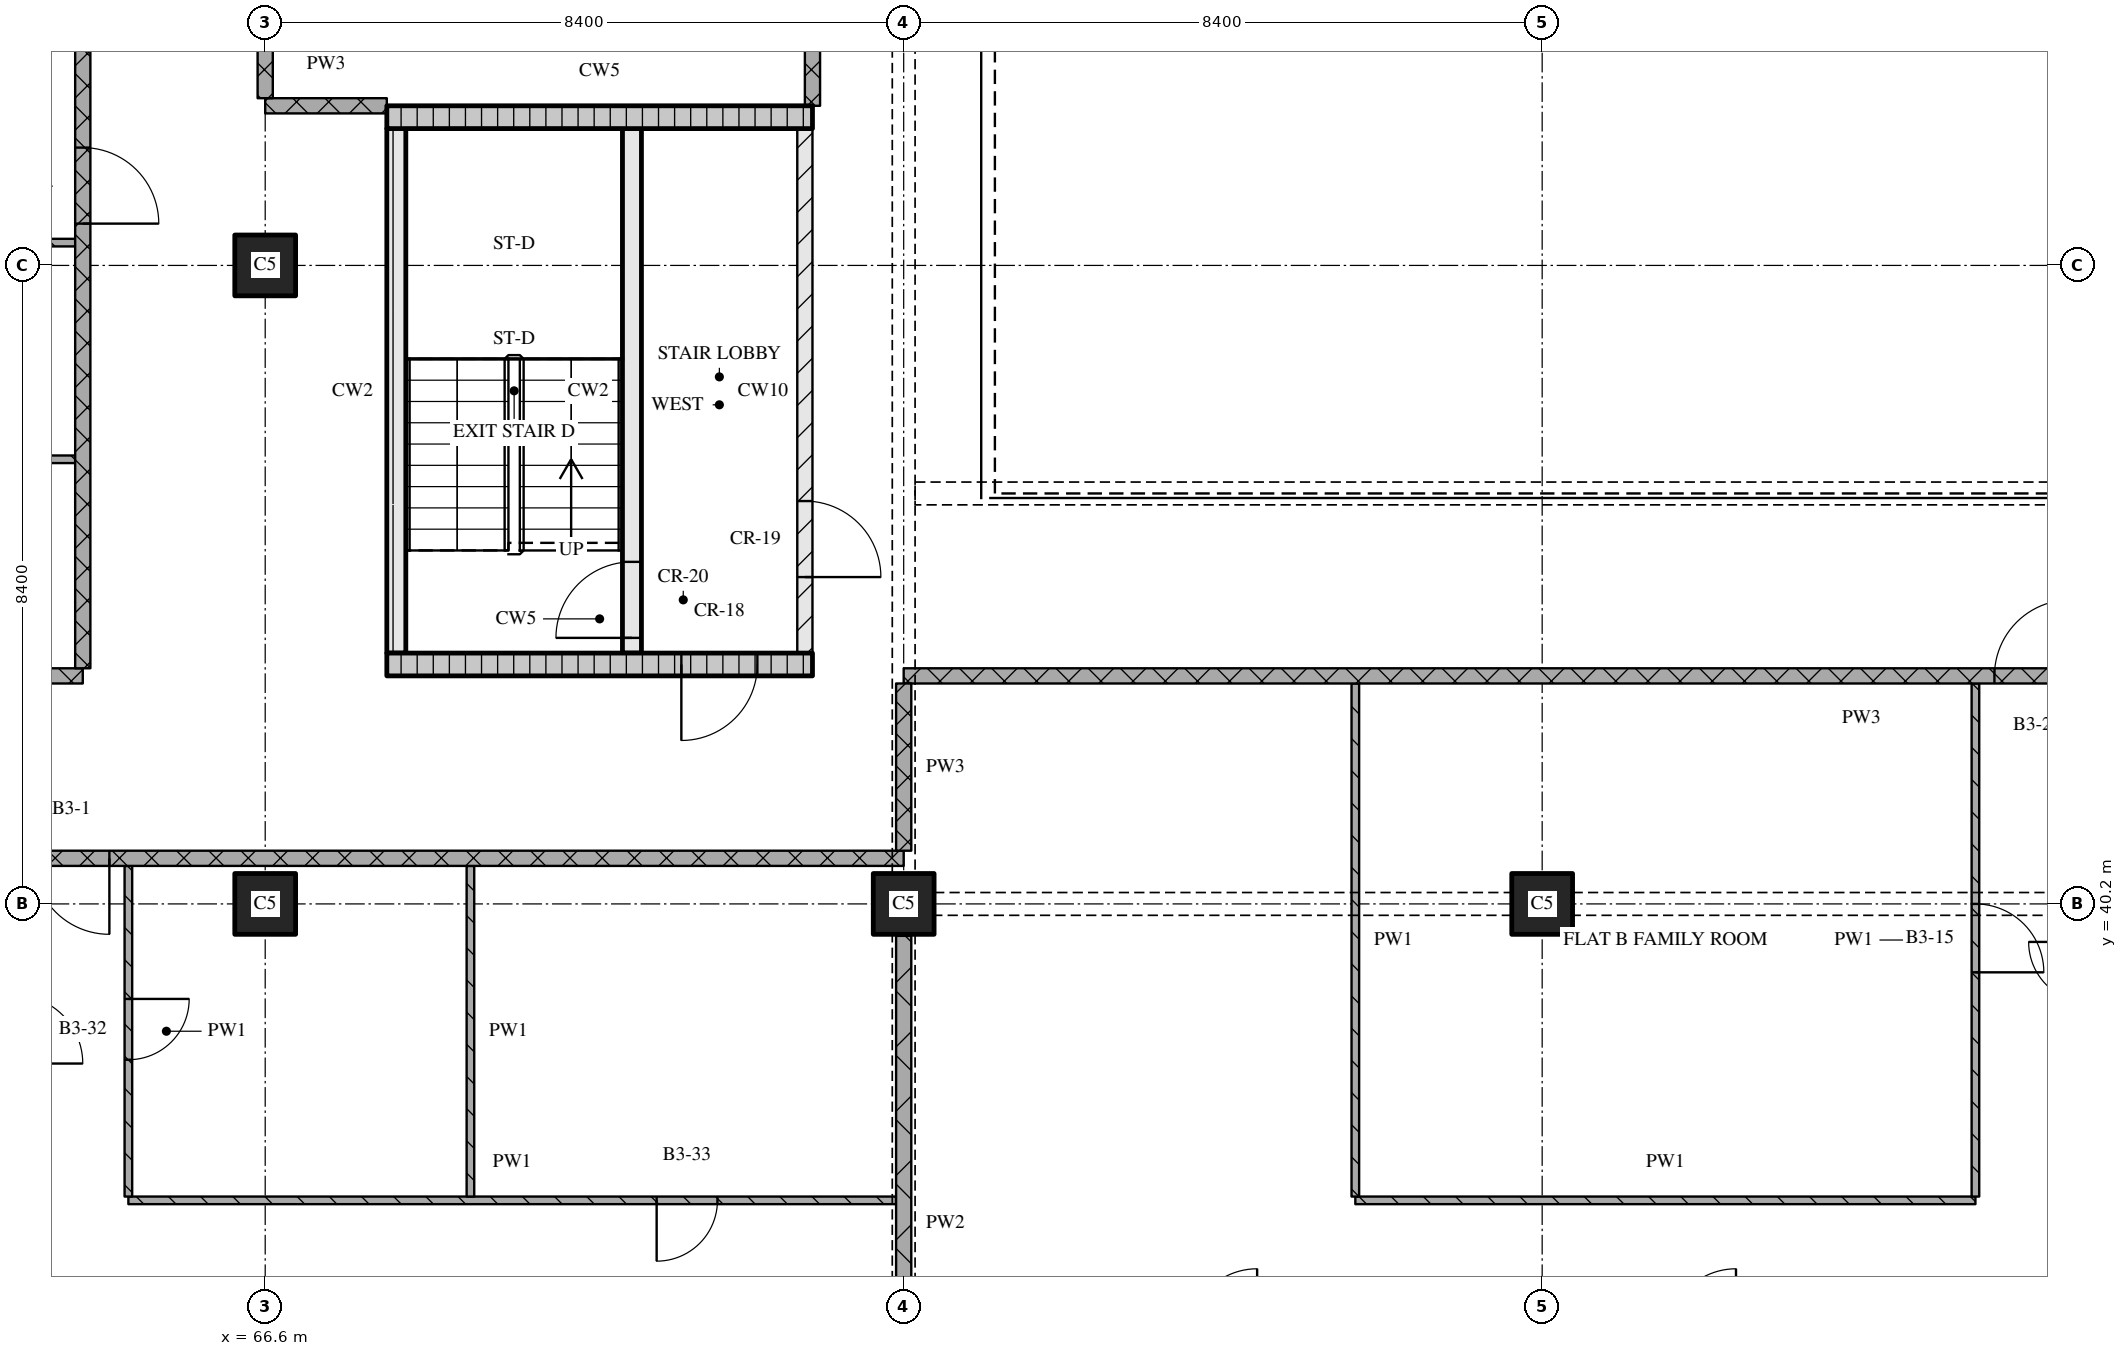
"""IFC4 building model, lengths in metres.
Left out: names, types, materials, properties, quantities, classifications, styles, units other than length and angle.
Written with IfcOpenShell. Run it as: python <this file> out.ifc"""

import sys

from ifc_helpers import new_model, si_unit, direction, frame, frame_2d, origin, origin_2d, place, context, subcontext, project, spatial, rectangle, extrude, element, fill, save


model = new_model("IFC4")
c1 = context("Model", 3, precision=1e-05, world=origin(), true_north=direction((0.0, 1.0)))
c2 = subcontext(c1, "Body", "Model", "MODEL_VIEW")
j1 = project(units=[si_unit("LENGTHUNIT", "METRE"), si_unit("PLANEANGLEUNIT", "RADIAN")], contexts=[c1])
p1 = place(None, origin())
s1 = spatial("IfcSite", under=j1, at=p1, CompositionType="ELEMENT")
p2 = place(p1, origin())
s2 = spatial("IfcBuilding", under=s1, at=p2, CompositionType="ELEMENT")
p3 = place(p2, frame((0.0, 0.0, 124.05)))
s3 = spatial("IfcBuildingStorey", under=s2, at=p3, CompositionType="ELEMENT", Elevation=124.05)
for number, where, z_axis, x_axis in (
    (1, (66.6, 40.2, 0.0), (0.0, 0.0, 1.0), (1.0, 0.0, 0.0)),
    (2, (66.6, 48.6, 0.0), (0.0, 0.0, 1.0), (1.0, 0.0, 0.0)),
    (3, (75.0, 40.2, 0.0), (0.0, 0.0, 1.0), (1.0, 0.0, 0.0)),
    (4, (83.4, 40.2, 0.0), (0.0, 0.0, 1.0), (1.0, 0.0, 0.0)),
):
    element("IfcColumn", number, at=place(p3, frame(where, z_axis=z_axis, x_axis=x_axis)), inside=s3, PredefinedType="COLUMN", context=c2, shape_type="SweptSolid", body=[
        extrude(rectangle(XDim=0.8, YDim=0.8, at=origin_2d()), origin(), (0.0, 0.0, 1.0), 3.6),
    ])
p4 = place(p3, frame((68.2, 43.35, 0.0), z_axis=(0.0, 0.0, 1.0), x_axis=(1.0, 0.0, 0.0)))
e5 = element("IfcWall", 5, at=p4, inside=s3, PredefinedType="SOLIDWALL", context=c2, shape_type="SweptSolid", body=[
    extrude(rectangle(XDim=5.6, YDim=0.3, at=frame_2d((2.8, 0.0))), origin(), (0.0, 0.0, 1.0), 3.32),
])
p5 = place(p4, frame((3.875, 0.0, 0.0)))
e6 = element("IfcOpeningElement", 6, at=p5, cuts=e5, PredefinedType="OPENING", context=c2, shape_type="SweptSolid", body=[
    extrude(rectangle(XDim=1.0, YDim=2.1, at=frame_2d((0.5, 1.05))), frame((0.0, 0.16, 0.0), z_axis=(0.0, -1.0, 0.0), x_axis=(1.0, 0.0, 0.0)), (0.0, 0.0, 1.0), 0.32),
])
p6 = place(p3, frame((68.325, 43.5, 0.0), z_axis=(0.0, 0.0, 1.0), x_axis=(0.0, 1.0, 0.0)))
e7 = element("IfcWall", 7, at=p6, inside=s3, PredefinedType="SOLIDWALL", context=c2, shape_type="SweptSolid", body=[
    extrude(rectangle(XDim=6.9, YDim=0.25, at=frame_2d((3.45, 0.0))), origin(), (0.0, 0.0, 1.0), 3.32),
])
p7 = place(p3, frame((71.425, 43.5, 0.0), z_axis=(0.0, 0.0, 1.0), x_axis=(0.0, 1.0, 0.0)))
e8 = element("IfcWall", 8, at=p7, inside=s3, PredefinedType="SOLIDWALL", context=c2, shape_type="SweptSolid", body=[
    extrude(rectangle(XDim=6.9, YDim=0.25, at=frame_2d((3.45, 0.0))), origin(), (0.0, 0.0, 1.0), 3.32),
])
p8 = place(p7, frame((0.2, 0.0, 0.0)))
e9 = element("IfcOpeningElement", 9, at=p8, cuts=e8, PredefinedType="OPENING", context=c2, shape_type="SweptSolid", body=[
    extrude(rectangle(XDim=1.0, YDim=2.1, at=frame_2d((0.5, 1.05))), frame((0.0, 0.135, 0.0), z_axis=(0.0, -1.0, 0.0), x_axis=(1.0, 0.0, 0.0)), (0.0, 0.0, 1.0), 0.27),
])
p9 = place(p3, frame((73.7, 43.5, 0.0), z_axis=(0.0, 0.0, 1.0), x_axis=(0.0, 1.0, 0.0)))
e10 = element("IfcWall", 10, at=p9, inside=s3, PredefinedType="PARTITIONING", context=c2, shape_type="SweptSolid", body=[
    extrude(rectangle(XDim=6.9, YDim=0.2, at=frame_2d((3.45, 0.0))), origin(), (0.0, 0.0, 1.0), 3.32),
])
p10 = place(p9, frame((1.0, 0.0, 0.0)))
e11 = element("IfcOpeningElement", 11, at=p10, cuts=e10, PredefinedType="OPENING", context=c2, shape_type="SweptSolid", body=[
    extrude(rectangle(XDim=1.0, YDim=2.1, at=frame_2d((0.5, 1.05))), frame((0.0, 0.11, 0.0), z_axis=(0.0, -1.0, 0.0), x_axis=(1.0, 0.0, 0.0)), (0.0, 0.0, 1.0), 0.22),
])
p11 = place(p3, frame((68.2, 50.55, 0.0), z_axis=(0.0, 0.0, 1.0), x_axis=(1.0, 0.0, 0.0)))
e12 = element("IfcWall", 12, at=p11, inside=s3, PredefinedType="SOLIDWALL", context=c2, shape_type="SweptSolid", body=[
    extrude(rectangle(XDim=5.6, YDim=0.3, at=frame_2d((2.8, 0.0))), origin(), (0.0, 0.0, 1.0), 3.32),
])
p12 = place(p3, frame((64.8, 36.3, 0.0), z_axis=(0.0, 0.0, 1.0), x_axis=(1.0, 0.0, 0.0)))
e13 = element("IfcWall", 13, at=p12, inside=s3, PredefinedType="PARTITIONING", context=c2, shape_type="SweptSolid", body=[
    extrude(rectangle(XDim=10.1, YDim=0.1, at=frame_2d((5.05, 0.0))), origin(), (0.0, 0.0, 1.0), 3.32),
])
p13 = place(p12, frame((6.95, 0.0, 0.0)))
e14 = element("IfcOpeningElement", 14, at=p13, cuts=e13, PredefinedType="OPENING", context=c2, shape_type="SweptSolid", body=[
    extrude(rectangle(XDim=0.8, YDim=2.1, at=frame_2d((0.4, 1.05))), frame((0.0, 0.06, 0.0), z_axis=(0.0, -1.0, 0.0), x_axis=(1.0, 0.0, 0.0)), (0.0, 0.0, 1.0), 0.12),
])
p14 = place(p3, frame((80.942, 36.3, 0.0), z_axis=(0.0, 0.0, 1.0), x_axis=(1.0, 0.0, 0.0)))
e15 = element("IfcWall", 15, at=p14, inside=s3, PredefinedType="PARTITIONING", context=c2, shape_type="SweptSolid", body=[
    extrude(rectangle(XDim=8.158, YDim=0.1, at=frame_2d((4.079, 0.0))), origin(), (0.0, 0.0, 1.0), 3.32),
])
p15 = place(p3, frame((75.0, 40.8, 0.0), z_axis=(0.0, 0.0, 1.0), x_axis=(-1.0, 0.0, 0.0)))
e16 = element("IfcWall", 16, at=p15, inside=s3, PredefinedType="PARTITIONING", context=c2, shape_type="SweptSolid", body=[
    extrude(rectangle(XDim=24.18, YDim=0.2, at=frame_2d((12.09, 0.0))), origin(), (0.0, 0.0, 1.0), 3.32),
])
p16 = place(p15, frame((10.45, 0.0, 0.0)))
e17 = element("IfcOpeningElement", 17, at=p16, cuts=e16, PredefinedType="OPENING", context=c2, shape_type="SweptSolid", body=[
    extrude(rectangle(XDim=1.0, YDim=2.1, at=frame_2d((0.5, 1.05))), frame((0.0, 0.11, 0.0), z_axis=(0.0, -1.0, 0.0), x_axis=(1.0, 0.0, 0.0)), (0.0, 0.0, 1.0), 0.22),
])
p17 = place(p3, frame((48.28, 43.2, 0.0), z_axis=(0.0, 0.0, 1.0), x_axis=(1.0, 0.0, 0.0)))
e18 = element("IfcWall", 18, at=p17, inside=s3, PredefinedType="PARTITIONING", context=c2, shape_type="SweptSolid", body=[
    extrude(rectangle(XDim=15.92, YDim=0.2, at=frame_2d((7.96, 0.0))), origin(), (0.0, 0.0, 1.0), 3.32),
])
p18 = place(p3, frame((100.2, 43.2, 0.0), z_axis=(0.0, 0.0, 1.0), x_axis=(-1.0, 0.0, 0.0)))
e19 = element("IfcWall", 19, at=p18, inside=s3, PredefinedType="PARTITIONING", context=c2, shape_type="SweptSolid", body=[
    extrude(rectangle(XDim=25.2, YDim=0.2, at=frame_2d((12.6, 0.0))), origin(), (0.0, 0.0, 1.0), 3.32),
])
p19 = place(p18, frame((9.85, 0.0, 0.0)))
e20 = element("IfcOpeningElement", 20, at=p19, cuts=e19, PredefinedType="OPENING", context=c2, shape_type="SweptSolid", body=[
    extrude(rectangle(XDim=1.0, YDim=2.1, at=frame_2d((0.5, 1.05))), frame((0.0, 0.11, 0.0), z_axis=(0.0, -1.0, 0.0), x_axis=(1.0, 0.0, 0.0)), (0.0, 0.0, 1.0), 0.22),
])
p20 = place(p3, frame((54.95, 46.05, 0.0), z_axis=(0.0, 0.0, 1.0), x_axis=(1.0, 0.0, 0.0)))
e21 = element("IfcWall", 21, at=p20, inside=s3, PredefinedType="PARTITIONING", context=c2, shape_type="SweptSolid", body=[
    extrude(rectangle(XDim=9.15, YDim=0.1, at=frame_2d((4.575, 0.0))), origin(), (0.0, 0.0, 1.0), 3.32),
])
p21 = place(p3, frame((58.62, 48.9, 0.0), z_axis=(0.0, 0.0, 1.0), x_axis=(1.0, 0.0, 0.0)))
e22 = element("IfcWall", 22, at=p21, inside=s3, PredefinedType="PARTITIONING", context=c2, shape_type="SweptSolid", body=[
    extrude(rectangle(XDim=5.48, YDim=0.1, at=frame_2d((2.74, 0.0))), origin(), (0.0, 0.0, 1.0), 3.32),
])
p22 = place(p3, frame((66.6, 50.7, 0.0), z_axis=(0.0, 0.0, 1.0), x_axis=(1.0, 0.0, 0.0)))
e23 = element("IfcWall", 23, at=p22, inside=s3, PredefinedType="PARTITIONING", context=c2, shape_type="SweptSolid", body=[
    extrude(rectangle(XDim=1.6, YDim=0.2, at=frame_2d((0.8, 0.0))), origin(), (0.0, 0.0, 1.0), 3.32),
])
p23 = place(p3, frame((64.2, 43.3, 0.0), z_axis=(0.0, 0.0, 1.0), x_axis=(0.0, 1.0, 0.0)))
e24 = element("IfcWall", 24, at=p23, inside=s3, PredefinedType="PARTITIONING", context=c2, shape_type="SweptSolid", body=[
    extrude(rectangle(XDim=32.02, YDim=0.2, at=frame_2d((16.01, 0.0))), origin(), (0.0, 0.0, 1.0), 3.32),
])
p24 = place(p23, frame((5.85, 0.0, 0.0)))
e25 = element("IfcOpeningElement", 25, at=p24, cuts=e24, PredefinedType="OPENING", context=c2, shape_type="SweptSolid", body=[
    extrude(rectangle(XDim=1.0, YDim=2.1, at=frame_2d((0.5, 1.05))), frame((0.0, 0.11, 0.0), z_axis=(0.0, -1.0, 0.0), x_axis=(1.0, 0.0, 0.0)), (0.0, 0.0, 1.0), 0.22),
])
p25 = place(p23, frame((25.95, 0.0, 0.0)))
e26 = element("IfcOpeningElement", 26, at=p25, cuts=e24, PredefinedType="OPENING", context=c2, shape_type="SweptSolid", body=[
    extrude(rectangle(XDim=1.0, YDim=2.1, at=frame_2d((0.5, 1.05))), frame((0.0, 0.11, 0.0), z_axis=(0.0, -1.0, 0.0), x_axis=(1.0, 0.0, 0.0)), (0.0, 0.0, 1.0), 0.22),
])
p26 = place(p3, frame((64.8, 40.7, 0.0), z_axis=(0.0, 0.0, 1.0), x_axis=(0.0, -1.0, 0.0)))
e27 = element("IfcWall", 27, at=p26, inside=s3, PredefinedType="PARTITIONING", context=c2, shape_type="SweptSolid", body=[
    extrude(rectangle(XDim=4.35, YDim=0.1, at=frame_2d((2.175, 0.0))), origin(), (0.0, 0.0, 1.0), 3.32),
])
p27 = place(p26, frame((1.75, 0.0, 0.0)))
e28 = element("IfcOpeningElement", 28, at=p27, cuts=e27, PredefinedType="OPENING", context=c2, shape_type="SweptSolid", body=[
    extrude(rectangle(XDim=0.8, YDim=2.1, at=frame_2d((0.4, 1.05))), frame((0.0, 0.06, 0.0), z_axis=(0.0, -1.0, 0.0), x_axis=(1.0, 0.0, 0.0)), (0.0, 0.0, 1.0), 0.12),
])
p28 = place(p3, frame((66.6, 56.58, 0.0), z_axis=(0.0, 0.0, 1.0), x_axis=(0.0, -1.0, 0.0)))
e29 = element("IfcWall", 29, at=p28, inside=s3, PredefinedType="PARTITIONING", context=c2, shape_type="SweptSolid", body=[
    extrude(rectangle(XDim=5.78, YDim=0.2, at=frame_2d((2.89, 0.0))), origin(), (0.0, 0.0, 1.0), 3.32),
])
p29 = place(p3, frame((69.3, 40.7, 0.0), z_axis=(0.0, 0.0, 1.0), x_axis=(0.0, -1.0, 0.0)))
e30 = element("IfcWall", 30, at=p29, inside=s3, PredefinedType="PARTITIONING", context=c2, shape_type="SweptSolid", body=[
    extrude(rectangle(XDim=4.35, YDim=0.1, at=frame_2d((2.175, 0.0))), origin(), (0.0, 0.0, 1.0), 3.32),
])
p30 = place(p3, frame((73.8, 58.7, 0.0), z_axis=(0.0, 0.0, 1.0), x_axis=(0.0, -1.0, 0.0)))
e31 = element("IfcWall", 31, at=p30, inside=s3, PredefinedType="PARTITIONING", context=c2, shape_type="SweptSolid", body=[
    extrude(rectangle(XDim=8.0, YDim=0.2, at=frame_2d((4.0, 0.0))), origin(), (0.0, 0.0, 1.0), 3.32),
])
p31 = place(p3, frame((75.0, 43.1, 0.0), z_axis=(0.0, 0.0, 1.0), x_axis=(0.0, -1.0, 0.0)))
e32 = element("IfcWall", 32, at=p31, inside=s3, PredefinedType="PARTITIONING", context=c2, shape_type="SweptSolid", body=[
    extrude(rectangle(XDim=2.2, YDim=0.2, at=frame_2d((1.1, 0.0))), origin(), (0.0, 0.0, 1.0), 2.43),
])
p32 = place(p3, frame((75.0, 39.78, 0.0), z_axis=(0.0, 0.0, 1.0), x_axis=(0.0, -1.0, 0.0)))
e33 = element("IfcWall", 33, at=p32, inside=s3, PredefinedType="PARTITIONING", context=c2, shape_type="SweptSolid", body=[
    extrude(rectangle(XDim=7.56, YDim=0.2, at=frame_2d((3.78, 0.0))), origin(), (0.0, 0.0, 1.0), 2.83),
])
p33 = place(p3, frame((80.942, 43.1, 0.0), z_axis=(0.0, 0.0, 1.0), x_axis=(0.0, -1.0, 0.0)))
e34 = element("IfcWall", 34, at=p33, inside=s3, PredefinedType="PARTITIONING", context=c2, shape_type="SweptSolid", body=[
    extrude(rectangle(XDim=6.75, YDim=0.1, at=frame_2d((3.375, 0.0))), origin(), (0.0, 0.0, 1.0), 3.32),
])
p34 = place(p3, frame((89.1, 36.35, 0.0), z_axis=(0.0, 0.0, 1.0), x_axis=(0.0, 1.0, 0.0)))
e35 = element("IfcWall", 35, at=p34, inside=s3, PredefinedType="PARTITIONING", context=c2, shape_type="SweptSolid", body=[
    extrude(rectangle(XDim=6.75, YDim=0.1, at=frame_2d((3.375, 0.0))), origin(), (0.0, 0.0, 1.0), 3.32),
])
p35 = place(p34, frame((2.95, 0.0, 0.0)))
e36 = element("IfcOpeningElement", 36, at=p35, cuts=e35, PredefinedType="OPENING", context=c2, shape_type="SweptSolid", body=[
    extrude(rectangle(XDim=0.9, YDim=2.1, at=frame_2d((0.45, 1.05))), frame((0.0, 0.06, 0.0), z_axis=(0.0, -1.0, 0.0), x_axis=(1.0, 0.0, 0.0)), (0.0, 0.0, 1.0), 0.12),
])
p36 = place(p5, origin())
e37 = element("IfcDoor", 37, at=p36, inside=s3, OperationType="SINGLE_SWING_RIGHT", PredefinedType="DOOR", context=c2, shape_type="SweptSolid", body=[
    extrude(rectangle(XDim=1.0, YDim=2.1, at=frame_2d((0.5, 1.05))), frame((0.0, 0.025, 0.0), z_axis=(0.0, -1.0, 0.0), x_axis=(1.0, 0.0, 0.0)), (0.0, 0.0, 1.0), 0.05),
])
fill(e6, e37)
p37 = place(p8, origin())
e38 = element("IfcDoor", 38, at=p37, inside=s3, OperationType="SINGLE_SWING_LEFT", PredefinedType="DOOR", context=c2, shape_type="SweptSolid", body=[
    extrude(rectangle(XDim=1.0, YDim=2.1, at=frame_2d((0.5, 1.05))), frame((0.0, 0.025, 0.0), z_axis=(0.0, -1.0, 0.0), x_axis=(1.0, 0.0, 0.0)), (0.0, 0.0, 1.0), 0.05),
])
fill(e9, e38)
p38 = place(p10, origin())
e39 = element("IfcDoor", 39, at=p38, inside=s3, OperationType="SINGLE_SWING_RIGHT", PredefinedType="DOOR", context=c2, shape_type="SweptSolid", body=[
    extrude(rectangle(XDim=1.0, YDim=2.1, at=frame_2d((0.5, 1.05))), frame((0.0, 0.025, 0.0), z_axis=(0.0, -1.0, 0.0), x_axis=(1.0, 0.0, 0.0)), (0.0, 0.0, 1.0), 0.05),
])
fill(e11, e39)
p39 = place(p13, origin())
e40 = element("IfcDoor", 40, at=p39, inside=s3, OperationType="SINGLE_SWING_RIGHT", PredefinedType="DOOR", context=c2, shape_type="SweptSolid", body=[
    extrude(rectangle(XDim=0.8, YDim=2.1, at=frame_2d((0.4, 1.05))), frame((0.0, 0.025, 0.0), z_axis=(0.0, -1.0, 0.0), x_axis=(1.0, 0.0, 0.0)), (0.0, 0.0, 1.0), 0.05),
])
fill(e14, e40)
p40 = place(p16, origin())
e41 = element("IfcDoor", 41, at=p40, inside=s3, OperationType="SINGLE_SWING_LEFT", PredefinedType="DOOR", context=c2, shape_type="SweptSolid", body=[
    extrude(rectangle(XDim=1.0, YDim=2.1, at=frame_2d((0.5, 1.05))), frame((0.0, 0.025, 0.0), z_axis=(0.0, -1.0, 0.0), x_axis=(1.0, 0.0, 0.0)), (0.0, 0.0, 1.0), 0.05),
])
fill(e17, e41)
p41 = place(p19, origin())
e42 = element("IfcDoor", 42, at=p41, inside=s3, OperationType="SINGLE_SWING_RIGHT", PredefinedType="DOOR", context=c2, shape_type="SweptSolid", body=[
    extrude(rectangle(XDim=1.0, YDim=2.1, at=frame_2d((0.5, 1.05))), frame((0.0, 0.025, 0.0), z_axis=(0.0, -1.0, 0.0), x_axis=(1.0, 0.0, 0.0)), (0.0, 0.0, 1.0), 0.05),
])
fill(e20, e42)
p42 = place(p24, origin())
e43 = element("IfcDoor", 43, at=p42, inside=s3, OperationType="SINGLE_SWING_RIGHT", PredefinedType="DOOR", context=c2, shape_type="SweptSolid", body=[
    extrude(rectangle(XDim=1.0, YDim=2.1, at=frame_2d((0.5, 1.05))), frame((0.0, 0.025, 0.0), z_axis=(0.0, -1.0, 0.0), x_axis=(1.0, 0.0, 0.0)), (0.0, 0.0, 1.0), 0.05),
])
fill(e25, e43)
p43 = place(p27, origin())
e44 = element("IfcDoor", 44, at=p43, inside=s3, OperationType="SINGLE_SWING_LEFT", PredefinedType="DOOR", context=c2, shape_type="SweptSolid", body=[
    extrude(rectangle(XDim=0.8, YDim=2.1, at=frame_2d((0.4, 1.05))), frame((0.0, 0.025, 0.0), z_axis=(0.0, -1.0, 0.0), x_axis=(1.0, 0.0, 0.0)), (0.0, 0.0, 1.0), 0.05),
])
fill(e28, e44)
p44 = place(p35, origin())
e45 = element("IfcDoor", 45, at=p44, inside=s3, OperationType="SINGLE_SWING_RIGHT", PredefinedType="DOOR", context=c2, shape_type="SweptSolid", body=[
    extrude(rectangle(XDim=0.9, YDim=2.1, at=frame_2d((0.45, 1.05))), frame((0.0, 0.025, 0.0), z_axis=(0.0, -1.0, 0.0), x_axis=(1.0, 0.0, 0.0)), (0.0, 0.0, 1.0), 0.05),
])
fill(e36, e45)
save(model, sys.argv[1])
